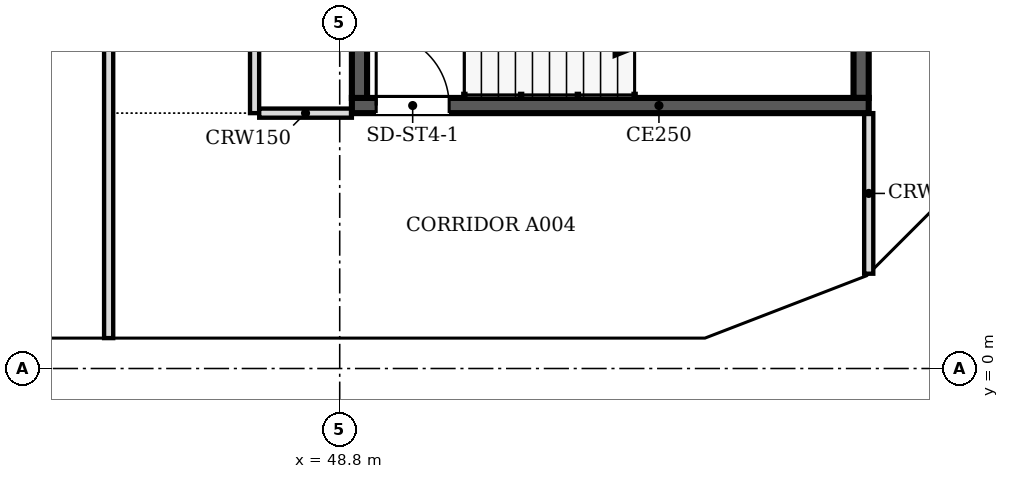
"""IFC4 building model, lengths in metres.
Left out: names, types, materials, properties, quantities, classifications, styles, units other than length and angle.
Written with IfcOpenShell. Run it as: python <this file> out.ifc"""

import sys

from ifc_helpers import new_model, si_unit, direction, frame, frame_2d, origin, place, context, subcontext, project, spatial, polyline, rectangle, outline, extrude, faceted_brep, source, transform, mapped, element, fill, save


model = new_model("IFC4")
c1 = context("Model", 3, precision=1e-05, world=origin(), true_north=direction((0.0, 1.0)))
c2 = subcontext(c1, "Body", "Model", "MODEL_VIEW")
j1 = project(units=[si_unit("LENGTHUNIT", "METRE"), si_unit("PLANEANGLEUNIT", "RADIAN")], contexts=[c1])
p1 = place(None, origin())
s1 = spatial("IfcSite", under=j1, at=p1, CompositionType="ELEMENT")
p2 = place(p1, origin())
s2 = spatial("IfcBuilding", under=s1, at=p2, CompositionType="ELEMENT")
p3 = place(p2, frame((0.0, 0.0, 68.6)))
s3 = spatial("IfcBuildingStorey", under=s2, at=p3, CompositionType="ELEMENT", Elevation=68.6)
m1 = source(origin(), c2, "Body", "SweptSolid", [
    extrude(outline(polyline([(6.1, 0.0), (3.05, 3.8), (0.0, 0.0), (6.1, 0.0)])), frame((0.0, 0.25, 0.0), z_axis=(0.0, -1.0, 0.0), x_axis=(1.0, 0.0, 0.0)), (0.0, 0.0, 1.0), 0.5),
])
p4 = place(p3, frame((39.65, 0.25, 0.0), z_axis=(0.0, 0.0, 1.0), x_axis=(1.0, 0.0, 0.0)))
e1 = element("IfcWall", 1, at=p4, inside=s3, PredefinedType="SOLIDWALL", context=c2, shape_type="MappedRepresentation", body=[
    mapped(m1, transform((0.0, 0.0, 0.0), scale=1.0)),
])
m2 = source(origin(), c2, "Body", "SweptSolid", [
    extrude(outline(polyline([(5.579, 0.25), (3.05, 3.4), (0.521, 0.25), (5.579, 0.25)])), frame((0.0, 0.26, 0.0), z_axis=(0.0, -1.0, 0.0), x_axis=(1.0, 0.0, 0.0)), (0.0, 0.0, 1.0), 0.52),
])
p5 = place(p4, origin())
e2 = element("IfcOpeningElement", 2, at=p5, cuts=e1, PredefinedType="OPENING", context=c2, shape_type="MappedRepresentation", body=[
    mapped(m2, transform((0.0, 0.0, 0.0), scale=1.0)),
])
p6 = place(p3, frame((45.75, 0.25, 0.0), z_axis=(0.0, 0.0, 1.0), x_axis=(1.0, 0.0, 0.0)))
e3 = element("IfcWall", 3, at=p6, inside=s3, PredefinedType="SOLIDWALL", context=c2, shape_type="MappedRepresentation", body=[
    mapped(m1, transform((0.0, 0.0, 0.0), scale=1.0)),
])
p7 = place(p6, origin())
e4 = element("IfcOpeningElement", 4, at=p7, cuts=e3, PredefinedType="OPENING", context=c2, shape_type="MappedRepresentation", body=[
    mapped(m2, transform((0.0, 0.0, 0.0), scale=1.0)),
])
m3 = source(origin(), c2, "Body", "Brep", [
    faceted_brep([(3.05, -0.25, 3.74), (3.003, -0.25, 3.8), (0.0, -0.25, 0.0), (3.05, -0.25, 0.0), (0.0, 0.25, 0.0), (2.957, 0.25, 3.741), (2.957, 0.25, 0.0), (3.003, 0.0, 3.8)], [[[0, 1, 2, 3]], [[4, 5, 6]], [[7, 1, 0]], [[5, 4, 2, 1, 7]], [[4, 6, 3, 2]], [[3, 6, 5, 7, 0]]]),
])
p8 = place(p3, frame((51.85, 0.25, 0.0), z_axis=(0.0, 0.0, 1.0), x_axis=(1.0, 0.0, 0.0)))
e5 = element("IfcWall", 5, at=p8, inside=s3, PredefinedType="SOLIDWALL", context=c2, shape_type="MappedRepresentation", body=[
    mapped(m3, transform((0.0, 0.0, 0.0), scale=1.0)),
])
m4 = source(origin(), c2, "Body", "SweptSolid", [
    extrude(outline(polyline([(2.803, 3.144), (0.516, 0.25), (2.803, 0.25), (2.803, 3.144)])), frame((0.0, 0.26, 0.0), z_axis=(0.0, -1.0, 0.0), x_axis=(1.0, 0.0, 0.0)), (0.0, 0.0, 1.0), 0.52),
])
p9 = place(p8, origin())
e6 = element("IfcOpeningElement", 6, at=p9, cuts=e5, PredefinedType="OPENING", context=c2, shape_type="MappedRepresentation", body=[
    mapped(m4, transform((0.0, 0.0, 0.0), scale=1.0)),
])
m5 = source(origin(), c2, "Body", "Brep", [
    faceted_brep([(2.997, -0.25, 0.0), (0.047, -0.25, 3.8), (0.0, -0.25, 3.741), (0.0, -0.25, 0.0), (0.093, 0.25, 3.74), (2.944, 0.25, 0.068), (2.944, 0.25, 0.0), (0.093, 0.25, 0.0), (0.047, 0.0, 3.8), (2.997, 0.0, 0.0)], [[[0, 1, 2, 3]], [[4, 5, 6, 7]], [[5, 4, 8, 1, 0, 9]], [[2, 1, 8]], [[7, 6, 9, 0, 3]], [[7, 3, 2, 8, 4]], [[9, 6, 5]]]),
])
p10 = place(p3, frame((54.81, 0.233, 0.0), z_axis=(0.0, 0.0, 1.0), x_axis=(0.932990326376, 0.359901446078, 0.0)))
e7 = element("IfcWall", 7, at=p10, inside=s3, PredefinedType="SOLIDWALL", context=c2, shape_type="MappedRepresentation", body=[
    mapped(m5, transform((0.0, 0.0, 0.0), scale=1.0)),
])
m6 = source(origin(), c2, "Body", "SweptSolid", [
    extrude(outline(polyline([(2.487, 0.25), (0.247, 3.135), (0.247, 0.25), (2.487, 0.25)])), frame((0.0, 0.26, 0.0), z_axis=(0.0, -1.0, 0.0), x_axis=(1.0, 0.0, 0.0)), (0.0, 0.0, 1.0), 0.52),
])
p11 = place(p10, origin())
e8 = element("IfcOpeningElement", 8, at=p11, cuts=e7, PredefinedType="OPENING", context=c2, shape_type="MappedRepresentation", body=[
    mapped(m6, transform((0.0, 0.0, 0.0), scale=1.0)),
])
m7 = source(origin(), c2, "Body", "Brep", [
    faceted_brep([(2.997, -0.25, 3.732), (2.944, -0.25, 3.8), (0.0, -0.25, 0.0), (2.997, -0.25, 0.0), (0.053, 0.25, 0.068), (2.891, 0.25, 3.732), (2.891, 0.25, 0.0), (0.053, 0.25, 0.0), (2.944, 0.0, 3.8), (0.0, 0.0, 0.0)], [[[0, 1, 2, 3]], [[4, 5, 6, 7]], [[8, 1, 0]], [[5, 4, 9, 2, 1, 8]], [[7, 6, 3, 2, 9]], [[7, 9, 4]], [[3, 6, 5, 8, 0]]]),
])
p12 = place(p3, frame((57.606, 1.312, 0.0), z_axis=(0.0, 0.0, 1.0), x_axis=(0.707147509625, 0.707066050402, 0.0)))
e9 = element("IfcWall", 9, at=p12, inside=s3, PredefinedType="SOLIDWALL", context=c2, shape_type="MappedRepresentation", body=[
    mapped(m7, transform((0.0, 0.0, 0.0), scale=1.0)),
])
m8 = source(origin(), c2, "Body", "SweptSolid", [
    extrude(outline(polyline([(2.744, 3.134), (0.51, 0.25), (2.744, 0.25), (2.744, 3.134)])), frame((0.0, 0.26, 0.0), z_axis=(0.0, -1.0, 0.0), x_axis=(1.0, 0.0, 0.0)), (0.0, 0.0, 1.0), 0.52),
])
p13 = place(p12, origin())
e10 = element("IfcOpeningElement", 10, at=p13, cuts=e9, PredefinedType="OPENING", context=c2, shape_type="MappedRepresentation", body=[
    mapped(m8, transform((0.0, 0.0, 0.0), scale=1.0)),
])
p14 = place(p2, frame((0.0, 0.0, 72.4)))
s4 = spatial("IfcBuildingStorey", under=s2, at=p14, CompositionType="ELEMENT", Elevation=72.4)
m9 = source(origin(), c2, "Body", "SweptSolid", [
    extrude(outline(polyline([(3.05, 0.0), (6.1, 3.8), (3.05, 7.6), (0.0, 3.8), (3.05, 0.0)])), frame((0.0, 0.25, 0.0), z_axis=(0.0, -1.0, 0.0), x_axis=(1.0, 0.0, 0.0)), (0.0, 0.0, 1.0), 0.5),
])
p15 = place(p14, frame((42.7, 0.25, -3.8), z_axis=(0.0, 0.0, 1.0), x_axis=(1.0, 0.0, 0.0)))
e11 = element("IfcWall", 11, at=p15, inside=s4, PredefinedType="SOLIDWALL", context=c2, shape_type="MappedRepresentation", body=[
    mapped(m9, transform((0.0, 0.0, 0.0), scale=1.0)),
])
m10 = source(origin(), c2, "Body", "SweptSolid", [
    extrude(outline(polyline([(3.05, 0.399), (5.78, 3.8), (3.05, 7.2), (0.321, 3.8), (3.05, 0.399)])), frame((0.0, 0.26, 0.0), z_axis=(0.0, -1.0, 0.0), x_axis=(1.0, 0.0, 0.0)), (0.0, 0.0, 1.0), 0.52),
])
p16 = place(p15, origin())
e12 = element("IfcOpeningElement", 12, at=p16, cuts=e11, PredefinedType="OPENING", context=c2, shape_type="MappedRepresentation", body=[
    mapped(m10, transform((0.0, 0.0, 0.0), scale=1.0)),
])
m11 = source(origin(), c2, "Body", "Brep", [
    faceted_brep([(3.05, -0.25, 0.0), (6.053, -0.25, 3.8), (3.05, -0.25, 7.6), (0.0, -0.25, 3.8), (0.0, 0.25, 3.8), (3.05, 0.25, 7.6), (6.007, 0.25, 3.859), (6.007, 0.25, 3.741), (3.05, 0.25, 0.0), (6.053, 0.0, 3.8)], [[[0, 1, 2, 3]], [[4, 5, 6, 7, 8]], [[8, 7, 9, 1, 0]], [[6, 5, 2, 1, 9]], [[5, 4, 3, 2]], [[4, 8, 0, 3]], [[9, 7, 6]]]),
])
p17 = place(p14, frame((48.8, 0.25, -3.8), z_axis=(0.0, 0.0, 1.0), x_axis=(1.0, 0.0, 0.0)))
e13 = element("IfcWall", 13, at=p17, inside=s4, PredefinedType="SOLIDWALL", context=c2, shape_type="MappedRepresentation", body=[
    mapped(m11, transform((0.0, 0.0, 0.0), scale=1.0)),
])
m12 = source(origin(), c2, "Body", "SweptSolid", [
    extrude(outline(polyline([(3.049, 0.401), (5.735, 3.8), (3.049, 7.199), (0.321, 3.8), (3.049, 0.401)])), frame((0.0, 0.26, 0.0), z_axis=(0.0, -1.0, 0.0), x_axis=(1.0, 0.0, 0.0)), (0.0, 0.0, 1.0), 0.52),
])
p18 = place(p17, origin())
e14 = element("IfcOpeningElement", 14, at=p18, cuts=e13, PredefinedType="OPENING", context=c2, shape_type="MappedRepresentation", body=[
    mapped(m12, transform((0.0, 0.0, 0.0), scale=1.0)),
])
m13 = source(origin(), c2, "Body", "Brep", [
    faceted_brep([(2.95, -0.25, 0.0), (3.003, -0.25, 0.068), (3.003, -0.25, 7.531), (2.95, -0.25, 7.6), (0.0, -0.25, 3.8), (0.047, 0.25, 3.86), (2.898, 0.25, 7.532), (2.898, 0.25, 0.068), (0.047, 0.25, 3.74), (2.95, 0.0, 0.0), (2.95, 0.0, 7.6), (0.0, 0.0, 3.8)], [[[0, 1, 2, 3, 4]], [[5, 6, 7, 8]], [[1, 0, 9]], [[10, 3, 2]], [[6, 5, 11, 4, 3, 10]], [[8, 7, 9, 0, 4, 11]], [[8, 11, 5]], [[1, 9, 7, 6, 10, 2]]]),
])
p19 = place(p14, frame((54.854, 0.25, -3.8), z_axis=(0.0, 0.0, 1.0), x_axis=(0.932970071518, 0.359953949349, 0.0)))
e15 = element("IfcWall", 15, at=p19, inside=s4, PredefinedType="SOLIDWALL", context=c2, shape_type="MappedRepresentation", body=[
    mapped(m13, transform((0.0, 0.0, 0.0), scale=1.0)),
])
m14 = source(origin(), c2, "Body", "SweptSolid", [
    extrude(outline(polyline([(2.75, 6.935), (0.316, 3.8), (2.75, 0.665), (2.75, 6.935)])), frame((0.0, 0.26, 0.0), z_axis=(0.0, -1.0, 0.0), x_axis=(1.0, 0.0, 0.0)), (0.0, 0.0, 1.0), 0.52),
])
p20 = place(p19, origin())
e16 = element("IfcOpeningElement", 16, at=p20, cuts=e15, PredefinedType="OPENING", context=c2, shape_type="MappedRepresentation", body=[
    mapped(m14, transform((0.0, 0.0, 0.0), scale=1.0)),
])
m15 = source(origin(), c2, "Body", "Brep", [
    faceted_brep([(0.053, -0.25, 0.0), (2.997, -0.25, 3.8), (0.053, -0.25, 7.6), (0.0, -0.25, 7.532), (0.0, -0.25, 0.068), (0.106, 0.25, 7.531), (2.944, 0.25, 3.868), (2.944, 0.25, 3.732), (0.106, 0.25, 0.068), (2.997, 0.0, 3.8), (0.053, 0.0, 0.0), (0.053, 0.0, 7.6)], [[[0, 1, 2, 3, 4]], [[5, 6, 7, 8]], [[8, 7, 9, 1, 0, 10]], [[6, 5, 11, 2, 1, 9]], [[3, 2, 11]], [[10, 0, 4]], [[8, 10, 4, 3, 11, 5]], [[9, 7, 6]]]),
])
p21 = place(p14, frame((57.569, 1.274, -3.8), z_axis=(0.0, 0.0, 1.0), x_axis=(0.707066050402, 0.707147509625, 0.0)))
e17 = element("IfcWall", 17, at=p21, inside=s4, PredefinedType="SOLIDWALL", context=c2, shape_type="MappedRepresentation", body=[
    mapped(m15, transform((0.0, 0.0, 0.0), scale=1.0)),
])
m16 = source(origin(), c2, "Body", "SweptSolid", [
    extrude(outline(polyline([(0.253, 0.666), (2.681, 3.8), (0.253, 6.934), (0.253, 0.666)])), frame((0.0, 0.26, 0.0), z_axis=(0.0, -1.0, 0.0), x_axis=(1.0, 0.0, 0.0)), (0.0, 0.0, 1.0), 0.52),
])
p22 = place(p21, origin())
e18 = element("IfcOpeningElement", 18, at=p22, cuts=e17, PredefinedType="OPENING", context=c2, shape_type="MappedRepresentation", body=[
    mapped(m16, transform((0.0, 0.0, 0.0), scale=1.0)),
])
p23 = place(p3, frame((57.5, 4.325, 0.0), z_axis=(0.0, 0.0, 1.0), x_axis=(-1.0, 0.0, 0.0)))
e19 = element("IfcWall", 19, at=p23, inside=s3, PredefinedType="SOLIDWALL", context=c2, shape_type="SweptSolid", body=[
    extrude(rectangle(XDim=8.5, YDim=0.25, at=frame_2d((4.25, 0.0))), origin(), (0.0, 0.0, 1.0), 3.8),
])
m17 = source(origin(), c2, "Body", "SweptSolid", [
    extrude(rectangle(XDim=1.2, YDim=2.1, at=frame_2d((0.6, 1.05))), frame((0.0, 0.135, 0.0), z_axis=(0.0, -1.0, 0.0), x_axis=(1.0, 0.0, 0.0)), (0.0, 0.0, 1.0), 0.27),
])
p24 = place(p23, frame((6.9, 0.0, 0.0)))
e20 = element("IfcOpeningElement", 20, at=p24, cuts=e19, PredefinedType="OPENING", context=c2, shape_type="MappedRepresentation", body=[
    mapped(m17, transform((0.0, 0.0, 0.0), scale=1.0)),
])
for number, where, z_axis, x_axis in (
    (21, (49.125, 4.45, 0.0), (0.0, 0.0, 1.0), (0.0, 1.0, 0.0)),
    (22, (57.375, 7.85, 0.0), (0.0, 0.0, 1.0), (0.0, -1.0, 0.0)),
):
    element("IfcWall", number, at=place(p3, frame(where, z_axis=z_axis, x_axis=x_axis)), inside=s3, PredefinedType="SOLIDWALL", context=c2, shape_type="SweptSolid", body=[
        extrude(rectangle(XDim=3.4, YDim=0.25, at=frame_2d((1.7, 0.0))), origin(), (0.0, 0.0, 1.0), 3.8),
    ])
p25 = place(p3, frame((45.0, 0.5, 0.0), z_axis=(0.0, 0.0, 1.0), x_axis=(0.0, 1.0, 0.0)))
e23 = element("IfcWall", 23, at=p25, inside=s3, PredefinedType="PARTITIONING", context=c2, shape_type="SweptSolid", body=[
    extrude(rectangle(XDim=21.724, YDim=0.15, at=frame_2d((10.862, 0.0))), origin(), (0.0, 0.0, 1.0), 3.067),
])
m18 = source(origin(), c2, "Body", "SweptSolid", [
    extrude(rectangle(XDim=0.9, YDim=2.1, at=frame_2d((0.45, 1.05))), frame((0.0, 0.085, 0.0), z_axis=(0.0, -1.0, 0.0), x_axis=(1.0, 0.0, 0.0)), (0.0, 0.0, 1.0), 0.17),
])
p26 = place(p25, frame((7.7, 0.0, 0.0)))
e24 = element("IfcOpeningElement", 24, at=p26, cuts=e23, PredefinedType="OPENING", context=c2, shape_type="MappedRepresentation", body=[
    mapped(m18, transform((0.0, 0.0, 0.0), scale=1.0)),
])
m19 = source(origin(), c2, "Body", "SweptSolid", [
    extrude(rectangle(XDim=1.0, YDim=2.1, at=frame_2d((0.5, 1.05))), frame((0.0, 0.085, 0.0), z_axis=(0.0, -1.0, 0.0), x_axis=(1.0, 0.0, 0.0)), (0.0, 0.0, 1.0), 0.17),
])
p27 = place(p25, frame((16.7, 0.0, 0.0)))
e25 = element("IfcOpeningElement", 25, at=p27, cuts=e23, PredefinedType="OPENING", context=c2, shape_type="MappedRepresentation", body=[
    mapped(m19, transform((0.0, 0.0, 0.0), scale=1.0)),
])
p28 = place(p3, frame((57.5, 1.559, 0.0), z_axis=(0.0, 0.0, 1.0), x_axis=(0.0, 1.0, 0.0)))
e26 = element("IfcWall", 26, at=p28, inside=s3, PredefinedType="PARTITIONING", context=c2, shape_type="SweptSolid", body=[
    extrude(rectangle(XDim=2.641, YDim=0.15, at=frame_2d((1.32, 0.0))), origin(), (0.0, 0.0, 1.0), 3.067),
])
p29 = place(p3, frame((47.4, 22.224, 0.0), z_axis=(0.0, 0.0, 1.0), x_axis=(0.0, -1.0, 0.0)))
e27 = element("IfcWall", 27, at=p29, inside=s3, PredefinedType="PARTITIONING", context=c2, shape_type="SweptSolid", body=[
    extrude(rectangle(XDim=18.024, YDim=0.15, at=frame_2d((9.012, 0.0))), origin(), (0.0, 0.0, 1.0), 3.067),
])
p30 = place(p29, frame((2.123, 0.0, 0.0)))
e28 = element("IfcOpeningElement", 28, at=p30, cuts=e27, PredefinedType="OPENING", context=c2, shape_type="MappedRepresentation", body=[
    mapped(m18, transform((0.0, 0.0, 0.0), scale=1.0)),
])
p31 = place(p29, frame((11.124, 0.0, 0.0)))
e29 = element("IfcOpeningElement", 29, at=p31, cuts=e27, PredefinedType="OPENING", context=c2, shape_type="MappedRepresentation", body=[
    mapped(m18, transform((0.0, 0.0, 0.0), scale=1.0)),
])
p32 = place(p3, frame((47.476, 4.2, 0.0), z_axis=(0.0, 0.0, 1.0), x_axis=(1.0, 0.0, 0.0)))
e30 = element("IfcWall", 30, at=p32, inside=s3, PredefinedType="PARTITIONING", context=c2, shape_type="SweptSolid", body=[
    extrude(rectangle(XDim=1.524, YDim=0.15, at=frame_2d((0.762, 0.0))), origin(), (0.0, 0.0, 1.0), 3.067),
])
m20 = source(origin(), c2, "Body", "SweptSolid", [
    extrude(rectangle(XDim=1.2, YDim=2.1, at=frame_2d((0.6, 1.05))), frame((0.0, 0.025, 0.0), z_axis=(0.0, -1.0, 0.0), x_axis=(1.0, 0.0, 0.0)), (0.0, 0.0, 1.0), 0.05),
])
p33 = place(p24, origin())
e31 = element("IfcDoor", 31, at=p33, inside=s3, OperationType="SINGLE_SWING_RIGHT", PredefinedType="DOOR", context=c2, shape_type="MappedRepresentation", body=[
    mapped(m20, transform((0.0, 0.0, 0.0), scale=1.0)),
])
fill(e20, e31)
save(model, sys.argv[1])
